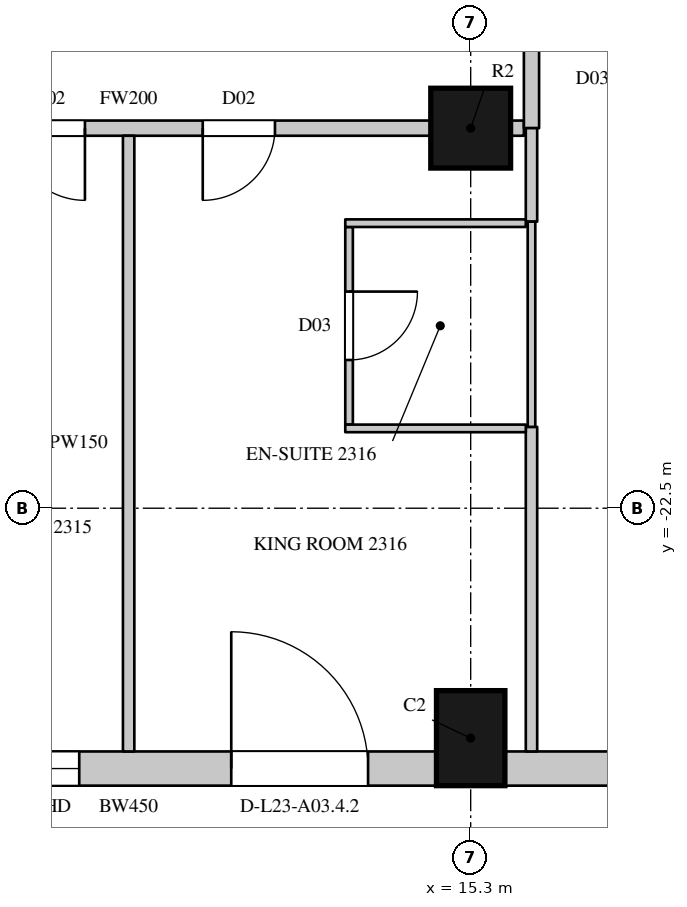
"""IFC4 building model, lengths in metres.
Left out: names, types, materials, properties, quantities, classifications, styles, units other than length and angle.
Written with IfcOpenShell. Run it as: python <this file> out.ifc"""

import sys

from ifc_helpers import new_model, si_unit, direction, frame, frame_2d, origin, origin_2d, place, context, subcontext, project, spatial, rectangle, circle, extrude, element, fill, save


model = new_model("IFC4")
c1 = context("Model", 3, precision=1e-05, world=origin(), true_north=direction((0.0, 1.0)))
c2 = subcontext(c1, "Body", "Model", "MODEL_VIEW")
j1 = project(units=[si_unit("LENGTHUNIT", "METRE"), si_unit("PLANEANGLEUNIT", "RADIAN")], contexts=[c1])
p1 = place(None, origin())
s1 = spatial("IfcSite", under=j1, at=p1, CompositionType="ELEMENT")
p2 = place(p1, origin())
s2 = spatial("IfcBuilding", under=s1, at=p2, CompositionType="ELEMENT")
p3 = place(p2, frame((0.0, 0.0, 113.1)))
s3 = spatial("IfcBuildingStorey", under=s2, at=p3, CompositionType="ELEMENT", Elevation=113.1)
p4 = place(p3, frame((15.3, -25.525, 0.0), z_axis=(0.0, 0.0, 1.0), x_axis=(1.0, 0.0, 0.0)))
e1 = element("IfcColumn", 1, at=p4, inside=s3, PredefinedType="COLUMN", context=c2, shape_type="SweptSolid", body=[
    extrude(rectangle(XDim=0.9, YDim=1.25, at=origin_2d()), origin(), (0.0, 0.0, 1.0), 3.6),
])
p5 = place(p3, frame((15.3, -17.5, 0.0), z_axis=(0.0, 0.0, 1.0), x_axis=(1.0, 0.0, 0.0)))
e2 = element("IfcColumn", 2, at=p5, inside=s3, PredefinedType="COLUMN", context=c2, shape_type="SweptSolid", body=[
    extrude(circle(Radius=0.525, at=origin_2d()), origin(), (0.0, 0.0, 1.0), 3.6),
])
p6 = place(p3, frame((6.75, -25.925, 0.0), z_axis=(0.0, 0.0, 1.0), x_axis=(1.0, 0.0, 0.0)))
e3 = element("IfcWall", 3, at=p6, inside=s3, PredefinedType="SOLIDWALL", context=c2, shape_type="SweptSolid", body=[
    extrude(rectangle(XDim=8.1, YDim=0.45, at=frame_2d((4.05, 0.0))), origin(), (0.0, 0.0, 1.0), 3.3),
])
p7 = place(p6, frame((0.2, 0.0, 0.0)))
e4 = element("IfcOpeningElement", 4, at=p7, cuts=e3, PredefinedType="OPENING", context=c2, shape_type="SweptSolid", body=[
    extrude(rectangle(XDim=1.8, YDim=2.4, at=frame_2d((0.9, 1.2))), frame((0.0, 0.235, 0.0), z_axis=(0.0, -1.0, 0.0), x_axis=(1.0, 0.0, 0.0)), (0.0, 0.0, 1.0), 0.47),
])
p8 = place(p6, frame((2.2, 0.0, 1.05)))
e5 = element("IfcOpeningElement", 5, at=p8, cuts=e3, PredefinedType="OPENING", context=c2, shape_type="SweptSolid", body=[
    extrude(rectangle(XDim=1.2, YDim=2.0, at=frame_2d((0.6, 1.0))), frame((0.0, 0.235, 0.0), z_axis=(0.0, -1.0, 0.0), x_axis=(1.0, 0.0, 0.0)), (0.0, 0.0, 1.0), 0.47),
])
p9 = place(p6, frame((5.4, 0.0, 0.0)))
e6 = element("IfcOpeningElement", 6, at=p9, cuts=e3, PredefinedType="OPENING", context=c2, shape_type="SweptSolid", body=[
    extrude(rectangle(XDim=1.8, YDim=2.4, at=frame_2d((0.9, 1.2))), frame((0.0, 0.235, 0.0), z_axis=(0.0, -1.0, 0.0), x_axis=(1.0, 0.0, 0.0)), (0.0, 0.0, 1.0), 0.47),
])
p10 = place(p3, frame((15.75, -25.925, 0.0), z_axis=(0.0, 0.0, 1.0), x_axis=(1.0, 0.0, 0.0)))
e7 = element("IfcWall", 7, at=p10, inside=s3, PredefinedType="SOLIDWALL", context=c2, shape_type="SweptSolid", body=[
    extrude(rectangle(XDim=2.914, YDim=0.45, at=frame_2d((1.457, 0.0))), origin(), (0.0, 0.0, 1.0), 3.3),
])
p11 = place(p3, frame((6.825, -17.5, 0.0), z_axis=(0.0, 0.0, 1.0), x_axis=(1.0, 0.0, 0.0)))
e8 = element("IfcWall", 8, at=p11, inside=s3, PredefinedType="PARTITIONING", context=c2, shape_type="SweptSolid", body=[
    extrude(rectangle(XDim=7.95, YDim=0.2, at=frame_2d((3.975, 0.0))), origin(), (0.0, 0.0, 1.0), 2.75),
])
p12 = place(p11, frame((2.45, 0.0, 0.0)))
e9 = element("IfcOpeningElement", 9, at=p12, cuts=e8, PredefinedType="OPENING", context=c2, shape_type="SweptSolid", body=[
    extrude(rectangle(XDim=0.95, YDim=2.2, at=frame_2d((0.475, 1.1))), frame((0.0, 0.11, 0.0), z_axis=(0.0, -1.0, 0.0), x_axis=(1.0, 0.0, 0.0)), (0.0, 0.0, 1.0), 0.22),
])
p13 = place(p11, frame((4.95, 0.0, 0.0)))
e10 = element("IfcOpeningElement", 10, at=p13, cuts=e8, PredefinedType="OPENING", context=c2, shape_type="SweptSolid", body=[
    extrude(rectangle(XDim=0.95, YDim=2.2, at=frame_2d((0.475, 1.1))), frame((0.0, 0.11, 0.0), z_axis=(0.0, -1.0, 0.0), x_axis=(1.0, 0.0, 0.0)), (0.0, 0.0, 1.0), 0.22),
])
p14 = place(p3, frame((15.825, -17.5, 0.0), z_axis=(0.0, 0.0, 1.0), x_axis=(1.0, 0.0, 0.0)))
e11 = element("IfcWall", 11, at=p14, inside=s3, PredefinedType="PARTITIONING", context=c2, shape_type="SweptSolid", body=[
    extrude(rectangle(XDim=0.175, YDim=0.2, at=frame_2d((0.087, 0.0))), origin(), (0.0, 0.0, 1.0), 3.3),
])
p15 = place(p3, frame((16.1, -17.5, 0.0), z_axis=(0.0, 0.0, 1.0), x_axis=(0.0, 1.0, 0.0)))
e12 = element("IfcWall", 12, at=p15, inside=s3, PredefinedType="PARTITIONING", context=c2, shape_type="SweptSolid", body=[
    extrude(rectangle(XDim=12.75, YDim=0.2, at=frame_2d((6.375, 0.0))), origin(), (0.0, 0.0, 1.0), 3.3),
])
p16 = place(p15, frame((2.75, 0.0, 0.0)))
e13 = element("IfcOpeningElement", 13, at=p16, cuts=e12, PredefinedType="OPENING", context=c2, shape_type="SweptSolid", body=[
    extrude(rectangle(XDim=0.95, YDim=2.2, at=frame_2d((0.475, 1.1))), frame((0.0, 0.11, 0.0), z_axis=(0.0, -1.0, 0.0), x_axis=(1.0, 0.0, 0.0)), (0.0, 0.0, 1.0), 0.22),
])
p17 = place(p15, frame((6.95, 0.0, 0.0)))
e14 = element("IfcOpeningElement", 14, at=p17, cuts=e12, PredefinedType="OPENING", context=c2, shape_type="SweptSolid", body=[
    extrude(rectangle(XDim=0.95, YDim=2.2, at=frame_2d((0.475, 1.1))), frame((0.0, 0.11, 0.0), z_axis=(0.0, -1.0, 0.0), x_axis=(1.0, 0.0, 0.0)), (0.0, 0.0, 1.0), 0.22),
])
p18 = place(p15, frame((11.4, 0.0, 0.0)))
e15 = element("IfcOpeningElement", 15, at=p18, cuts=e12, PredefinedType="OPENING", context=c2, shape_type="SweptSolid", body=[
    extrude(rectangle(XDim=0.95, YDim=2.2, at=frame_2d((0.475, 1.1))), frame((0.0, 0.11, 0.0), z_axis=(0.0, -1.0, 0.0), x_axis=(1.0, 0.0, 0.0)), (0.0, 0.0, 1.0), 0.22),
])
p19 = place(p3, frame((10.8, -25.7, 0.0), z_axis=(0.0, 0.0, 1.0), x_axis=(0.0, 1.0, 0.0)))
e16 = element("IfcWall", 16, at=p19, inside=s3, PredefinedType="PARTITIONING", context=c2, shape_type="SweptSolid", body=[
    extrude(rectangle(XDim=8.1, YDim=0.15, at=frame_2d((4.05, 0.0))), origin(), (0.0, 0.0, 1.0), 2.65),
])
p20 = place(p3, frame((16.1, -25.7, 0.0), z_axis=(0.0, 0.0, 1.0), x_axis=(0.0, 1.0, 0.0)))
e17 = element("IfcWall", 17, at=p20, inside=s3, PredefinedType="PARTITIONING", context=c2, shape_type="SweptSolid", body=[
    extrude(rectangle(XDim=4.27, YDim=0.15, at=frame_2d((2.135, 0.0))), origin(), (0.0, 0.0, 1.0), 3.3),
])
p21 = place(p3, frame((16.1, -18.73, 0.0), z_axis=(0.0, 0.0, 1.0), x_axis=(0.0, 1.0, 0.0)))
e18 = element("IfcWall", 18, at=p21, inside=s3, PredefinedType="PARTITIONING", context=c2, shape_type="SweptSolid", body=[
    extrude(rectangle(XDim=1.23, YDim=0.15, at=frame_2d((0.615, 0.0))), origin(), (0.0, 0.0, 1.0), 3.3),
])
p22 = place(p3, frame((13.7, -21.4, 0.0), z_axis=(0.0, 0.0, 1.0), x_axis=(0.0, 1.0, 0.0)))
e19 = element("IfcWall", 19, at=p22, inside=s3, PredefinedType="PARTITIONING", context=c2, shape_type="SweptSolid", body=[
    extrude(rectangle(XDim=2.6, YDim=0.1, at=frame_2d((1.3, 0.0))), origin(), (0.0, 0.0, 1.0), 3.3),
])
p23 = place(p22, frame((0.85, 0.0, 0.0)))
e20 = element("IfcOpeningElement", 20, at=p23, cuts=e19, PredefinedType="OPENING", context=c2, shape_type="SweptSolid", body=[
    extrude(rectangle(XDim=0.9, YDim=2.2, at=frame_2d((0.45, 1.1))), frame((0.0, 0.06, 0.0), z_axis=(0.0, -1.0, 0.0), x_axis=(1.0, 0.0, 0.0)), (0.0, 0.0, 1.0), 0.12),
])
for number, where, z_axis, x_axis in (
    (21, (13.65, -21.45, 0.0), (0.0, 0.0, 1.0), (1.0, 0.0, 0.0)),
    (22, (13.65, -18.75, 0.0), (0.0, 0.0, 1.0), (1.0, 0.0, 0.0)),
):
    element("IfcWall", number, at=place(p3, frame(where, z_axis=z_axis, x_axis=x_axis)), inside=s3, PredefinedType="PARTITIONING", context=c2, shape_type="SweptSolid", body=[
        extrude(rectangle(XDim=2.375, YDim=0.1, at=frame_2d((1.188, 0.0))), origin(), (0.0, 0.0, 1.0), 3.3),
    ])
p24 = place(p3, frame((16.1, -21.43, 0.0), z_axis=(0.0, 0.0, 1.0), x_axis=(0.0, 1.0, 0.0)))
e23 = element("IfcWall", 23, at=p24, inside=s3, PredefinedType="PARTITIONING", context=c2, shape_type="SweptSolid", body=[
    extrude(rectangle(XDim=2.7, YDim=0.1, at=frame_2d((1.35, 0.0))), origin(), (0.0, 0.0, 1.0), 3.3),
])
p25 = place(p8, origin())
e24 = element("IfcWindow", 24, at=p25, inside=s3, PartitioningType="SINGLE_PANEL", PredefinedType="WINDOW", context=c2, shape_type="SweptSolid", body=[
    extrude(rectangle(XDim=1.2, YDim=2.0, at=frame_2d((0.6, 1.0))), frame((0.0, 0.135, 0.0), z_axis=(0.0, -1.0, 0.0), x_axis=(1.0, 0.0, 0.0)), (0.0, 0.0, 1.0), 0.06),
])
fill(e5, e24)
p26 = place(p9, origin())
e25 = element("IfcDoor", 25, at=p26, inside=s3, OperationType="SLIDING_TO_LEFT", PredefinedType="DOOR", context=c2, shape_type="SweptSolid", body=[
    extrude(rectangle(XDim=1.8, YDim=2.4, at=frame_2d((0.9, 1.2))), frame((0.0, 0.13, 0.0), z_axis=(0.0, -1.0, 0.0), x_axis=(1.0, 0.0, 0.0)), (0.0, 0.0, 1.0), 0.05),
])
fill(e6, e25)
p27 = place(p12, origin())
e26 = element("IfcDoor", 26, at=p27, inside=s3, OperationType="SINGLE_SWING_LEFT", PredefinedType="DOOR", context=c2, shape_type="SweptSolid", body=[
    extrude(rectangle(XDim=0.95, YDim=2.2, at=frame_2d((0.475, 1.1))), frame((0.0, 0.025, 0.0), z_axis=(0.0, -1.0, 0.0), x_axis=(1.0, 0.0, 0.0)), (0.0, 0.0, 1.0), 0.05),
])
fill(e9, e26)
p28 = place(p13, origin())
e27 = element("IfcDoor", 27, at=p28, inside=s3, OperationType="SINGLE_SWING_RIGHT", PredefinedType="DOOR", context=c2, shape_type="SweptSolid", body=[
    extrude(rectangle(XDim=0.95, YDim=2.2, at=frame_2d((0.475, 1.1))), frame((0.0, 0.025, 0.0), z_axis=(0.0, -1.0, 0.0), x_axis=(1.0, 0.0, 0.0)), (0.0, 0.0, 1.0), 0.05),
])
fill(e10, e27)
p29 = place(p23, origin())
e28 = element("IfcDoor", 28, at=p29, inside=s3, OperationType="SINGLE_SWING_LEFT", PredefinedType="DOOR", context=c2, shape_type="SweptSolid", body=[
    extrude(rectangle(XDim=0.9, YDim=2.2, at=frame_2d((0.45, 1.1))), frame((0.0, 0.025, 0.0), z_axis=(0.0, -1.0, 0.0), x_axis=(1.0, 0.0, 0.0)), (0.0, 0.0, 1.0), 0.05),
])
fill(e20, e28)
save(model, sys.argv[1])
